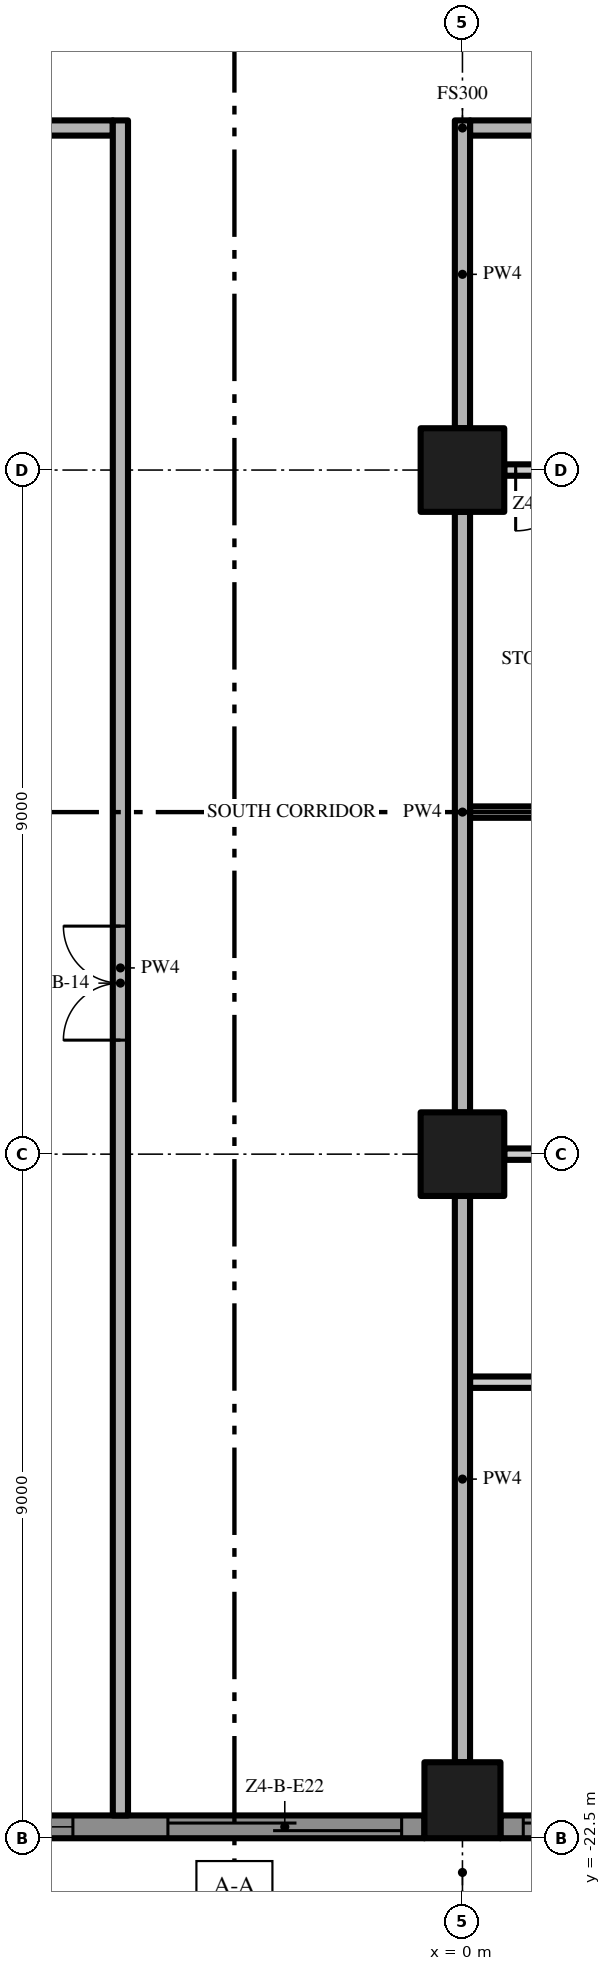
"""IFC4 building model, lengths in metres.
Left out: names, types, materials, properties, quantities, classifications, styles, units other than length and angle.
Written with IfcOpenShell. Run it as: python <this file> out.ifc"""

import sys

from ifc_helpers import new_model, si_unit, direction, frame, frame_2d, origin, origin_2d, place, context, subcontext, project, spatial, polyline, rectangle, outline, extrude, element, fill, save


model = new_model("IFC4")
c1 = context("Model", 3, precision=1e-05, world=origin(), true_north=direction((0.0, 1.0)))
c2 = subcontext(c1, "Body", "Model", "MODEL_VIEW")
j1 = project(units=[si_unit("LENGTHUNIT", "METRE"), si_unit("PLANEANGLEUNIT", "RADIAN")], contexts=[c1])
p1 = place(None, origin())
s1 = spatial("IfcSite", under=j1, at=p1, CompositionType="ELEMENT")
p2 = place(p1, origin())
s2 = spatial("IfcBuilding", under=s1, at=p2, CompositionType="ELEMENT")
p3 = place(p2, frame((0.0, 0.0, 203.4)))
s3 = spatial("IfcBuildingStorey", under=s2, at=p3, CompositionType="ELEMENT", Elevation=203.4)
p4 = place(p3, frame((0.0, -13.5, 0.0), z_axis=(0.0, 0.0, 1.0), x_axis=(1.0, 0.0, 0.0)))
e1 = element("IfcColumn", 1, at=p4, inside=s3, PredefinedType="COLUMN", context=c2, shape_type="SweptSolid", body=[
    extrude(rectangle(XDim=1.1, YDim=1.1, at=origin_2d()), origin(), (0.0, 0.0, 1.0), 3.5),
])
p5 = place(p3, frame((0.0, -22.0, 0.0), z_axis=(0.0, 0.0, 1.0), x_axis=(1.0, 0.0, 0.0)))
e2 = element("IfcColumn", 2, at=p5, inside=s3, PredefinedType="COLUMN", context=c2, shape_type="SweptSolid", body=[
    extrude(rectangle(XDim=1.0, YDim=1.0, at=origin_2d()), origin(), (0.0, 0.0, 1.0), 3.5),
])
p6 = place(p3, frame((0.0, -4.5, 0.0), z_axis=(0.0, 0.0, 1.0), x_axis=(1.0, 0.0, 0.0)))
e3 = element("IfcColumn", 3, at=p6, inside=s3, PredefinedType="COLUMN", context=c2, shape_type="SweptSolid", body=[
    extrude(rectangle(XDim=1.1, YDim=1.1, at=origin_2d()), origin(), (0.0, 0.0, 1.0), 3.5),
])
p7 = place(p3, frame((-0.5, -22.35, 0.0), z_axis=(0.0, 0.0, 1.0), x_axis=(-1.0, 0.0, 0.0)))
e4 = element("IfcWall", 4, at=p7, inside=s3, PredefinedType="SOLIDWALL", context=c2, shape_type="SweptSolid", body=[
    extrude(rectangle(XDim=8.0, YDim=0.3, at=frame_2d((4.0, 0.0))), origin(), (0.0, 0.0, 1.0), 3.5),
])
p8 = place(p7, frame((4.625, 0.0, 0.45)))
e5 = element("IfcOpeningElement", 5, at=p8, cuts=e4, PredefinedType="OPENING", context=c2, shape_type="SweptSolid", body=[
    extrude(rectangle(XDim=3.075, YDim=2.65, at=frame_2d((1.538, 1.325))), frame((0.0, 0.16, 0.0), z_axis=(0.0, -1.0, 0.0), x_axis=(1.0, 0.0, 0.0)), (0.0, 0.0, 1.0), 0.32),
])
p9 = place(p7, frame((0.3, 0.0, 0.0)))
e6 = element("IfcOpeningElement", 6, at=p9, cuts=e4, PredefinedType="OPENING", context=c2, shape_type="SweptSolid", body=[
    extrude(rectangle(XDim=3.075, YDim=2.4, at=frame_2d((1.538, 1.2))), frame((0.0, 0.16, 0.0), z_axis=(0.0, -1.0, 0.0), x_axis=(1.0, 0.0, 0.0)), (0.0, 0.0, 1.0), 0.32),
])
p10 = place(p3, frame((8.5, -22.35, 0.0), z_axis=(0.0, 0.0, 1.0), x_axis=(-1.0, 0.0, 0.0)))
e7 = element("IfcWall", 7, at=p10, inside=s3, PredefinedType="SOLIDWALL", context=c2, shape_type="SweptSolid", body=[
    extrude(rectangle(XDim=8.0, YDim=0.3, at=frame_2d((4.0, 0.0))), origin(), (0.0, 0.0, 1.0), 3.5),
])
p11 = place(p10, frame((4.625, 0.0, 0.0)))
e8 = element("IfcOpeningElement", 8, at=p11, cuts=e7, PredefinedType="OPENING", context=c2, shape_type="SweptSolid", body=[
    extrude(rectangle(XDim=3.075, YDim=2.4, at=frame_2d((1.538, 1.2))), frame((0.0, 0.16, 0.0), z_axis=(0.0, -1.0, 0.0), x_axis=(1.0, 0.0, 0.0)), (0.0, 0.0, 1.0), 0.32),
])
p12 = place(p10, frame((0.3, 0.0, 0.45)))
e9 = element("IfcOpeningElement", 9, at=p12, cuts=e7, PredefinedType="OPENING", context=c2, shape_type="SweptSolid", body=[
    extrude(rectangle(XDim=3.075, YDim=2.65, at=frame_2d((1.538, 1.325))), frame((0.0, 0.16, 0.0), z_axis=(0.0, -1.0, 0.0), x_axis=(1.0, 0.0, 0.0)), (0.0, 0.0, 1.0), 0.32),
])
p13 = place(p3, origin())
e10 = element("IfcWall", 10, at=p13, inside=s3, PredefinedType="USERDEFINED", context=c2, shape_type="SweptSolid", body=[
    extrude(outline(polyline([(-22.5, -23.1), (-21.0, -23.329), (-19.5, -23.929), (-18.0, -24.671), (-16.5, -25.271), (-15.0, -25.5), (-13.5, -25.271), (-12.0, -24.671), (-10.5, -23.929), (-9.0, -23.329), (-7.5, -23.1), (-6.0, -23.329), (-4.5, -23.929), (-3.0, -24.671), (-1.5, -25.271), (0.0, -25.5), (1.5, -25.271), (3.0, -24.671), (4.5, -23.929), (6.0, -23.329), (7.5, -23.1), (9.0, -23.329), (10.5, -23.929), (12.0, -24.671), (13.5, -25.271), (15.0, -25.5), (16.5, -25.271), (18.0, -24.671), (19.5, -23.929), (21.0, -23.329), (22.5, -23.1), (22.462, -22.853), (20.934, -23.086), (19.398, -23.701), (17.898, -24.442), (16.434, -25.028), (15.0, -25.247), (13.566, -25.028), (12.102, -24.442), (10.602, -23.701), (9.066, -23.086), (7.5, -22.847), (5.934, -23.086), (4.398, -23.701), (2.898, -24.442), (1.434, -25.028), (0.0, -25.247), (-1.434, -25.028), (-2.898, -24.442), (-4.398, -23.701), (-5.934, -23.086), (-7.5, -22.847), (-9.066, -23.086), (-10.602, -23.701), (-12.102, -24.442), (-13.566, -25.028), (-15.0, -25.247), (-16.434, -25.028), (-17.898, -24.442), (-19.398, -23.701), (-20.934, -23.086), (-22.462, -22.853), (-22.5, -23.1)])), origin(), (0.0, 0.0, 1.0), 0.9),
])
p14 = place(p3, frame((0.1, -16.5, 0.0), z_axis=(0.0, 0.0, 1.0), x_axis=(1.0, 0.0, 0.0)))
e11 = element("IfcWall", 11, at=p14, inside=s3, PredefinedType="PARTITIONING", context=c2, shape_type="SweptSolid", body=[
    extrude(rectangle(XDim=2.075, YDim=0.15, at=frame_2d((1.038, 0.0))), origin(), (0.0, 0.0, 1.0), 3.5),
])
p15 = place(p3, frame((8.45, -13.5, 0.0), z_axis=(0.0, 0.0, 1.0), x_axis=(-1.0, 0.0, 0.0)))
e12 = element("IfcWall", 12, at=p15, inside=s3, PredefinedType="PARTITIONING", context=c2, shape_type="SweptSolid", body=[
    extrude(rectangle(XDim=7.9, YDim=0.15, at=frame_2d((3.95, 0.0))), origin(), (0.0, 0.0, 1.0), 3.5),
])
p16 = place(p15, frame((1.95, 0.0, 0.0)))
e13 = element("IfcOpeningElement", 13, at=p16, cuts=e12, PredefinedType="OPENING", context=c2, shape_type="SweptSolid", body=[
    extrude(rectangle(XDim=1.8, YDim=2.4, at=frame_2d((0.9, 1.2))), frame((0.0, 0.085, 0.0), z_axis=(0.0, -1.0, 0.0), x_axis=(1.0, 0.0, 0.0)), (0.0, 0.0, 1.0), 0.17),
])
p17 = place(p3, frame((0.1, -9.0, 0.0), z_axis=(0.0, 0.0, 1.0), x_axis=(1.0, 0.0, 0.0)))
e14 = element("IfcWall", 14, at=p17, inside=s3, PredefinedType="PARTITIONING", context=c2, shape_type="SweptSolid", body=[
    extrude(rectangle(XDim=13.4, YDim=0.15, at=frame_2d((6.7, 0.0))), origin(), (0.0, 0.0, 1.0), 3.5),
])
p18 = place(p17, frame((6.9, 0.0, 0.0)))
e15 = element("IfcOpeningElement", 15, at=p18, cuts=e14, PredefinedType="OPENING", context=c2, shape_type="SweptSolid", body=[
    extrude(rectangle(XDim=1.0, YDim=2.4, at=frame_2d((0.5, 1.2))), frame((0.0, 0.085, 0.0), z_axis=(0.0, -1.0, 0.0), x_axis=(1.0, 0.0, 0.0)), (0.0, 0.0, 1.0), 0.17),
])
p19 = place(p3, frame((8.45, -4.5, 0.0), z_axis=(0.0, 0.0, 1.0), x_axis=(-1.0, 0.0, 0.0)))
e16 = element("IfcWall", 16, at=p19, inside=s3, PredefinedType="PARTITIONING", context=c2, shape_type="SweptSolid", body=[
    extrude(rectangle(XDim=7.9, YDim=0.15, at=frame_2d((3.95, 0.0))), origin(), (0.0, 0.0, 1.0), 3.5),
])
p20 = place(p19, frame((6.95, 0.0, 0.0)))
e17 = element("IfcOpeningElement", 17, at=p20, cuts=e16, PredefinedType="OPENING", context=c2, shape_type="SweptSolid", body=[
    extrude(rectangle(XDim=0.8, YDim=2.0, at=frame_2d((0.4, 1.0))), frame((0.0, 0.085, 0.0), z_axis=(0.0, -1.0, 0.0), x_axis=(1.0, 0.0, 0.0)), (0.0, 0.0, 1.0), 0.17),
])
p21 = place(p19, frame((4.9, 0.0, 0.0)))
e18 = element("IfcOpeningElement", 18, at=p21, cuts=e16, PredefinedType="OPENING", context=c2, shape_type="SweptSolid", body=[
    extrude(rectangle(XDim=0.8, YDim=2.0, at=frame_2d((0.4, 1.0))), frame((0.0, 0.085, 0.0), z_axis=(0.0, -1.0, 0.0), x_axis=(1.0, 0.0, 0.0)), (0.0, 0.0, 1.0), 0.17),
])
p22 = place(p3, frame((-17.4, 0.0, 0.0), z_axis=(0.0, 0.0, 1.0), x_axis=(1.0, 0.0, 0.0)))
e19 = element("IfcWall", 19, at=p22, inside=s3, PredefinedType="PARTITIONING", context=c2, shape_type="SweptSolid", body=[
    extrude(rectangle(XDim=12.8, YDim=0.2, at=frame_2d((6.4, 0.0))), origin(), (0.0, 0.0, 1.0), 3.5),
])
p23 = place(p3, frame((17.4, 0.0, 0.0), z_axis=(0.0, 0.0, 1.0), x_axis=(-1.0, 0.0, 0.0)))
e20 = element("IfcWall", 20, at=p23, inside=s3, PredefinedType="PARTITIONING", context=c2, shape_type="SweptSolid", body=[
    extrude(rectangle(XDim=17.3, YDim=0.2, at=frame_2d((8.65, 0.0))), origin(), (0.0, 0.0, 1.0), 3.5),
])
p24 = place(p23, frame((7.65, 0.0, 0.0)))
e21 = element("IfcOpeningElement", 21, at=p24, cuts=e20, PredefinedType="OPENING", context=c2, shape_type="SweptSolid", body=[
    extrude(rectangle(XDim=1.5, YDim=2.4, at=frame_2d((0.75, 1.2))), frame((0.0, 0.11, 0.0), z_axis=(0.0, -1.0, 0.0), x_axis=(1.0, 0.0, 0.0)), (0.0, 0.0, 1.0), 0.22),
])
p25 = place(p3, frame((-4.5, -22.2, 0.0), z_axis=(0.0, 0.0, 1.0), x_axis=(0.0, 1.0, 0.0)))
e22 = element("IfcWall", 22, at=p25, inside=s3, PredefinedType="PARTITIONING", context=c2, shape_type="SweptSolid", body=[
    extrude(rectangle(XDim=22.3, YDim=0.2, at=frame_2d((11.15, 0.0))), origin(), (0.0, 0.0, 1.0), 3.5),
])
p26 = place(p25, frame((10.2, 0.0, 0.0)))
e23 = element("IfcOpeningElement", 23, at=p26, cuts=e22, PredefinedType="OPENING", context=c2, shape_type="SweptSolid", body=[
    extrude(rectangle(XDim=1.5, YDim=2.4, at=frame_2d((0.75, 1.2))), frame((0.0, 0.11, 0.0), z_axis=(0.0, -1.0, 0.0), x_axis=(1.0, 0.0, 0.0)), (0.0, 0.0, 1.0), 0.22),
])
p27 = place(p3, frame((0.0, -21.5, 0.0), z_axis=(0.0, 0.0, 1.0), x_axis=(0.0, 1.0, 0.0)))
e24 = element("IfcWall", 24, at=p27, inside=s3, PredefinedType="PARTITIONING", context=c2, shape_type="SweptSolid", body=[
    extrude(rectangle(XDim=7.45, YDim=0.2, at=frame_2d((3.725, 0.0))), origin(), (0.0, 0.0, 1.0), 3.5),
])
p28 = place(p3, frame((0.0, -12.95, 0.0), z_axis=(0.0, 0.0, 1.0), x_axis=(0.0, 1.0, 0.0)))
e25 = element("IfcWall", 25, at=p28, inside=s3, PredefinedType="PARTITIONING", context=c2, shape_type="SweptSolid", body=[
    extrude(rectangle(XDim=7.9, YDim=0.2, at=frame_2d((3.95, 0.0))), origin(), (0.0, 0.0, 1.0), 3.5),
])
p29 = place(p3, frame((0.0, -3.95, 0.0), z_axis=(0.0, 0.0, 1.0), x_axis=(0.0, 1.0, 0.0)))
e26 = element("IfcWall", 26, at=p29, inside=s3, PredefinedType="PARTITIONING", context=c2, shape_type="SweptSolid", body=[
    extrude(rectangle(XDim=4.05, YDim=0.2, at=frame_2d((2.025, 0.0))), origin(), (0.0, 0.0, 1.0), 3.5),
])
p30 = place(p8, origin())
e27 = element("IfcWindow", 27, at=p30, inside=s3, PartitioningType="SINGLE_PANEL", PredefinedType="WINDOW", context=c2, shape_type="SweptSolid", body=[
    extrude(rectangle(XDim=3.075, YDim=2.65, at=frame_2d((1.538, 1.325))), frame((0.0, 0.03, 0.0), z_axis=(0.0, -1.0, 0.0), x_axis=(1.0, 0.0, 0.0)), (0.0, 0.0, 1.0), 0.06),
])
fill(e5, e27)
p31 = place(p9, origin())
e28 = element("IfcDoor", 28, at=p31, inside=s3, OperationType="SINGLE_SWING_LEFT", PredefinedType="DOOR", context=c2, shape_type="SweptSolid", body=[
    extrude(rectangle(XDim=3.075, YDim=2.4, at=frame_2d((1.538, 1.2))), frame((0.0, 0.025, 0.0), z_axis=(0.0, -1.0, 0.0), x_axis=(1.0, 0.0, 0.0)), (0.0, 0.0, 1.0), 0.05),
])
fill(e6, e28)
p32 = place(p11, origin())
e29 = element("IfcDoor", 29, at=p32, inside=s3, OperationType="SINGLE_SWING_LEFT", PredefinedType="DOOR", context=c2, shape_type="SweptSolid", body=[
    extrude(rectangle(XDim=3.075, YDim=2.4, at=frame_2d((1.538, 1.2))), frame((0.0, 0.025, 0.0), z_axis=(0.0, -1.0, 0.0), x_axis=(1.0, 0.0, 0.0)), (0.0, 0.0, 1.0), 0.05),
])
fill(e8, e29)
p33 = place(p26, origin())
e30 = element("IfcDoor", 30, at=p33, inside=s3, OperationType="DOUBLE_DOOR_SINGLE_SWING", PredefinedType="DOOR", context=c2, shape_type="SweptSolid", body=[
    extrude(rectangle(XDim=1.5, YDim=2.4, at=frame_2d((0.75, 1.2))), frame((0.0, 0.025, 0.0), z_axis=(0.0, -1.0, 0.0), x_axis=(1.0, 0.0, 0.0)), (0.0, 0.0, 1.0), 0.05),
])
fill(e23, e30)
p34 = place(p20, origin())
e31 = element("IfcDoor", 31, at=p34, inside=s3, OperationType="SINGLE_SWING_RIGHT", PredefinedType="DOOR", context=c2, shape_type="SweptSolid", body=[
    extrude(rectangle(XDim=0.8, YDim=2.0, at=frame_2d((0.4, 1.0))), frame((0.0, 0.025, 0.0), z_axis=(0.0, -1.0, 0.0), x_axis=(1.0, 0.0, 0.0)), (0.0, 0.0, 1.0), 0.05),
])
fill(e17, e31)
save(model, sys.argv[1])
